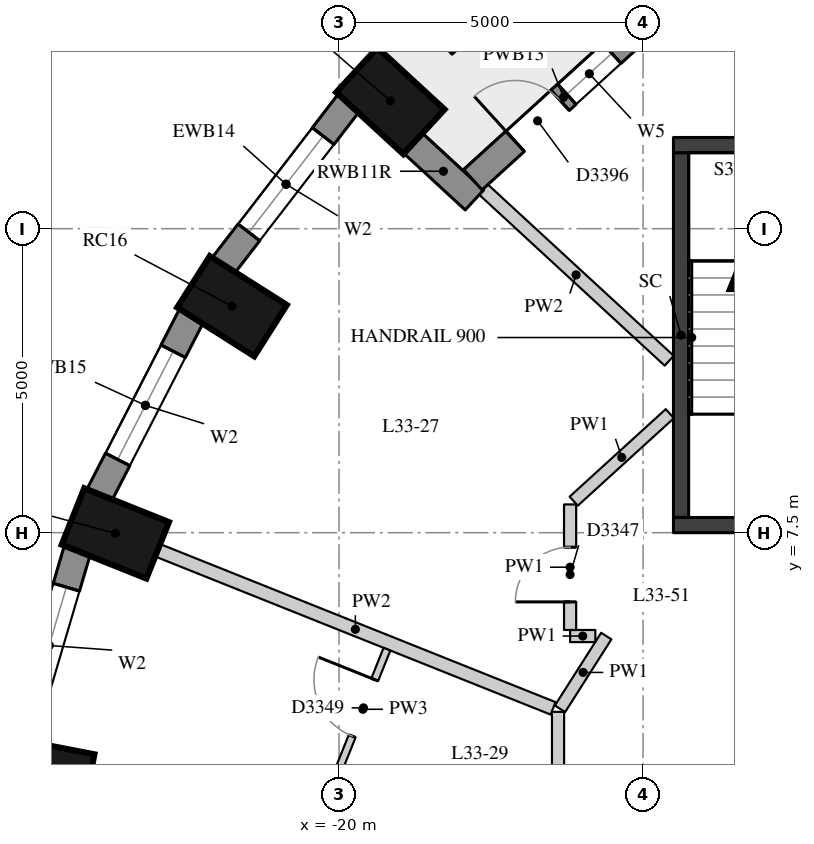
"""IFC4 building model, lengths in metres.
Left out: names, types, materials, properties, quantities, classifications, styles, units other than length and angle.
Written with IfcOpenShell. Run it as: python <this file> out.ifc"""

import sys

from ifc_helpers import new_model, si_unit, direction, frame, frame_2d, origin, origin_2d, place, context, subcontext, project, spatial, rectangle, extrude, element, fill, save


model = new_model("IFC4")
c1 = context("Model", 3, precision=1e-05, world=origin(), true_north=direction((0.0, 1.0)))
c2 = subcontext(c1, "Body", "Model", "MODEL_VIEW")
j1 = project(units=[si_unit("LENGTHUNIT", "METRE"), si_unit("PLANEANGLEUNIT", "RADIAN")], contexts=[c1])
p1 = place(None, origin())
s1 = spatial("IfcSite", under=j1, at=p1, CompositionType="ELEMENT")
p2 = place(p1, origin())
s2 = spatial("IfcBuilding", under=s1, at=p2, CompositionType="ELEMENT")
p3 = place(p2, frame((0.0, 0.0, 118.6)))
s3 = spatial("IfcBuildingStorey", under=s2, at=p3, CompositionType="ELEMENT", Elevation=118.6)
for number, where, z_axis, x_axis in (
    (1, (-19.156, 14.602, 0.0), (0.0, 0.0, 1.0), (-0.735, 0.678, 0.0)),
    (2, (-21.76, 11.225, 0.0), (0.0, 0.0, 1.0), (-0.845, 0.536, 0.0)),
    (3, (-23.679, 7.489, 0.0), (0.0, 0.0, 1.0), (-0.929, 0.371, 0.0)),
    (4, (-24.854, 3.507, 0.0), (0.0, 0.0, 1.0), (-0.982, 0.19, 0.0)),
):
    element("IfcColumn", number, at=place(p3, frame(where, z_axis=z_axis, x_axis=x_axis)), inside=s3, PredefinedType="COLUMN", context=c2, shape_type="SweptSolid", body=[
        extrude(rectangle(XDim=1.5, YDim=1.0, at=origin_2d()), origin(), (0.0, 0.0, 1.0), 3.3),
    ])
p4 = place(p3, frame((-19.835, 14.575, 0.0), z_axis=(0.0, 0.0, 1.0), x_axis=(-0.610693945156, -0.791866721961, 0.0)))
e5 = element("IfcWall", 5, at=p4, inside=s3, PredefinedType="SOLIDWALL", context=c2, shape_type="SweptSolid", body=[
    extrude(rectangle(XDim=3.395, YDim=0.45, at=frame_2d((1.697, 0.0))), origin(), (0.0, 0.0, 1.0), 3.02),
])
p5 = place(p4, frame((0.697, 0.0, 0.4)))
e6 = element("IfcOpeningElement", 6, at=p5, cuts=e5, PredefinedType="OPENING", context=c2, shape_type="SweptSolid", body=[
    extrude(rectangle(XDim=2.0, YDim=1.75, at=frame_2d((1.0, 0.875))), frame((0.0, 0.235, 0.0), z_axis=(0.0, -1.0, 0.0), x_axis=(1.0, 0.0, 0.0)), (0.0, 0.0, 1.0), 0.47),
])
p6 = place(p3, frame((-22.423, 11.077, 0.0), z_axis=(0.0, 0.0, 1.0), x_axis=(-0.456828186229, -0.889554949549, 0.0)))
e7 = element("IfcWall", 7, at=p6, inside=s3, PredefinedType="SOLIDWALL", context=c2, shape_type="SweptSolid", body=[
    extrude(rectangle(XDim=3.333, YDim=0.45, at=frame_2d((1.667, 0.0))), origin(), (0.0, 0.0, 1.0), 3.02),
])
p7 = place(p6, frame((0.666, 0.0, 0.4)))
e8 = element("IfcOpeningElement", 8, at=p7, cuts=e7, PredefinedType="OPENING", context=c2, shape_type="SweptSolid", body=[
    extrude(rectangle(XDim=2.0, YDim=1.75, at=frame_2d((1.0, 0.875))), frame((0.0, 0.235, 0.0), z_axis=(0.0, -1.0, 0.0), x_axis=(1.0, 0.0, 0.0)), (0.0, 0.0, 1.0), 0.47),
])
p8 = place(p3, frame((-24.302, 7.221, 0.0), z_axis=(0.0, 0.0, 1.0), x_axis=(-0.283071248438, -0.959098883488, 0.0)))
e9 = element("IfcWall", 9, at=p8, inside=s3, PredefinedType="SOLIDWALL", context=c2, shape_type="SweptSolid", body=[
    extrude(rectangle(XDim=3.286, YDim=0.45, at=frame_2d((1.643, 0.0))), origin(), (0.0, 0.0, 1.0), 3.02),
])
p9 = place(p8, frame((0.643, 0.0, 0.4)))
e10 = element("IfcOpeningElement", 10, at=p9, cuts=e9, PredefinedType="OPENING", context=c2, shape_type="SweptSolid", body=[
    extrude(rectangle(XDim=2.0, YDim=1.75, at=frame_2d((1.0, 0.875))), frame((0.0, 0.235, 0.0), z_axis=(0.0, -1.0, 0.0), x_axis=(1.0, 0.0, 0.0)), (0.0, 0.0, 1.0), 0.47),
])
p10 = place(p3, frame((-18.795, 13.916, 0.0), z_axis=(0.0, 0.0, 1.0), x_axis=(0.735395448697, -0.677638202905, 0.0)))
e11 = element("IfcWall", 11, at=p10, inside=s3, PredefinedType="SOLIDWALL", context=c2, shape_type="SweptSolid", body=[
    extrude(rectangle(XDim=1.391, YDim=0.45, at=frame_2d((0.695, 0.0))), origin(), (0.0, 0.0, 1.0), 3.02),
])
p11 = place(p3, frame((-14.818, 16.018, 0.0), z_axis=(0.0, 0.0, 1.0), x_axis=(-0.739460283824, -0.673200184675, 0.0)))
e12 = element("IfcWall", 12, at=p11, inside=s3, PredefinedType="SOLIDWALL", context=c2, shape_type="SweptSolid", body=[
    extrude(rectangle(XDim=4.031, YDim=0.45, at=frame_2d((2.016, 0.0))), origin(), (0.0, 0.0, 1.0), 3.02),
])
p12 = place(p11, frame((0.94, 0.0, 0.4)))
e13 = element("IfcOpeningElement", 13, at=p12, cuts=e12, PredefinedType="OPENING", context=c2, shape_type="SweptSolid", body=[
    extrude(rectangle(XDim=1.0, YDim=1.75, at=frame_2d((0.5, 0.875))), frame((0.0, 0.235, 0.0), z_axis=(0.0, -1.0, 0.0), x_axis=(1.0, 0.0, 0.0)), (0.0, 0.0, 1.0), 0.47),
])
p13 = place(p11, frame((2.091, 0.0, 0.0)))
e14 = element("IfcOpeningElement", 14, at=p13, cuts=e12, PredefinedType="OPENING", context=c2, shape_type="SweptSolid", body=[
    extrude(rectangle(XDim=1.0, YDim=2.15, at=frame_2d((0.5, 1.075))), frame((0.0, 0.235, 0.0), z_axis=(0.0, -1.0, 0.0), x_axis=(1.0, 0.0, 0.0)), (0.0, 0.0, 1.0), 0.47),
])
p14 = place(p3, frame((-17.044, 16.839, 0.0), z_axis=(0.0, 0.0, 1.0), x_axis=(-0.740332755969, -0.6722405897, 0.0)))
e15 = element("IfcWall", 15, at=p14, inside=s3, PredefinedType="USERDEFINED", context=c2, shape_type="SweptSolid", body=[
    extrude(rectangle(XDim=1.8, YDim=0.7, at=frame_2d((0.9, 0.0))), origin(), (0.0, 0.0, 1.0), 0.75),
])
p15 = place(p3, frame((-14.375, 7.75, -0.28), z_axis=(0.0, 0.0, 1.0), x_axis=(0.0, 1.0, 0.0)))
e16 = element("IfcWall", 16, at=p15, inside=s3, PredefinedType="SHEAR", context=c2, shape_type="SweptSolid", body=[
    extrude(rectangle(XDim=6.0, YDim=0.25, at=frame_2d((3.0, 0.0))), origin(), (0.0, 0.0, 1.0), 3.3),
])
for number, where, z_axis, x_axis in (
    (17, (-14.5, 13.875, -0.28), (0.0, 0.0, 1.0), (1.0, 0.0, 0.0)),
    (18, (-14.5, 7.625, -0.28), (0.0, 0.0, 1.0), (1.0, 0.0, 0.0)),
):
    element("IfcWall", number, at=place(p3, frame(where, z_axis=z_axis, x_axis=x_axis)), inside=s3, PredefinedType="SHEAR", context=c2, shape_type="SweptSolid", body=[
        extrude(rectangle(XDim=5.2, YDim=0.25, at=frame_2d((2.6, 0.0))), origin(), (0.0, 0.0, 1.0), 3.3),
    ])
p16 = place(p3, frame((-16.398, -5.693, 0.0), z_axis=(0.0, 0.0, 1.0), x_axis=(0.0, 1.0, 0.0)))
e19 = element("IfcWall", 19, at=p16, inside=s3, PredefinedType="PARTITIONING", context=c2, shape_type="SweptSolid", body=[
    extrude(rectangle(XDim=10.246, YDim=0.2, at=frame_2d((5.123, 0.0))), origin(), (0.0, 0.0, 1.0), 3.02),
])
p17 = place(p16, frame((6.539, 0.0, 0.0)))
e20 = element("IfcOpeningElement", 20, at=p17, cuts=e19, PredefinedType="OPENING", context=c2, shape_type="SweptSolid", body=[
    extrude(rectangle(XDim=1.1, YDim=2.1, at=frame_2d((0.55, 1.05))), frame((0.0, 0.11, 0.0), z_axis=(0.0, -1.0, 0.0), x_axis=(1.0, 0.0, 0.0)), (0.0, 0.0, 1.0), 0.22),
])
p18 = place(p16, frame((3.337, 0.0, 0.0)))
e21 = element("IfcOpeningElement", 21, at=p18, cuts=e19, PredefinedType="OPENING", context=c2, shape_type="SweptSolid", body=[
    extrude(rectangle(XDim=1.1, YDim=2.1, at=frame_2d((0.55, 1.05))), frame((0.0, 0.11, 0.0), z_axis=(0.0, -1.0, 0.0), x_axis=(1.0, 0.0, 0.0)), (0.0, 0.0, 1.0), 0.22),
])
p19 = place(p3, frame((-16.366, 4.604, 0.0), z_axis=(0.0, 0.0, 1.0), x_axis=(0.536775234189, 0.843725279911, 0.0)))
e22 = element("IfcWall", 22, at=p19, inside=s3, PredefinedType="PARTITIONING", context=c2, shape_type="SweptSolid", body=[
    extrude(rectangle(XDim=1.418, YDim=0.2, at=frame_2d((0.709, 0.0))), origin(), (0.0, 0.0, 1.0), 3.02),
])
p20 = place(p3, frame((-15.785, 5.8, 0.0), z_axis=(0.0, 0.0, 1.0), x_axis=(-1.0, 0.0, 0.0)))
e23 = element("IfcWall", 23, at=p20, inside=s3, PredefinedType="PARTITIONING", context=c2, shape_type="SweptSolid", body=[
    extrude(rectangle(XDim=0.415, YDim=0.2, at=frame_2d((0.208, 0.0))), origin(), (0.0, 0.0, 1.0), 3.02),
])
p21 = place(p3, frame((-16.2, 5.9, 0.0), z_axis=(0.0, 0.0, 1.0), x_axis=(0.0, 1.0, 0.0)))
e24 = element("IfcWall", 24, at=p21, inside=s3, PredefinedType="PARTITIONING", context=c2, shape_type="SweptSolid", body=[
    extrude(rectangle(XDim=2.065, YDim=0.2, at=frame_2d((1.032, 0.0))), origin(), (0.0, 0.0, 1.0), 3.02),
])
p22 = place(p21, frame((0.462, 0.0, 0.0)))
e25 = element("IfcOpeningElement", 25, at=p22, cuts=e24, PredefinedType="OPENING", context=c2, shape_type="SweptSolid", body=[
    extrude(rectangle(XDim=0.9, YDim=2.1, at=frame_2d((0.45, 1.05))), frame((0.0, 0.11, 0.0), z_axis=(0.0, -1.0, 0.0), x_axis=(1.0, 0.0, 0.0)), (0.0, 0.0, 1.0), 0.22),
])
p23 = place(p3, frame((-16.14, 8.019, 0.0), z_axis=(0.0, 0.0, 1.0), x_axis=(0.739392120684, 0.673275049197, 0.0)))
e26 = element("IfcWall", 26, at=p23, inside=s3, PredefinedType="PARTITIONING", context=c2, shape_type="SweptSolid", body=[
    extrude(rectangle(XDim=2.138, YDim=0.2, at=frame_2d((1.069, 0.0))), origin(), (0.0, 0.0, 1.0), 3.02),
])
p24 = place(p3, frame((-17.633, 13.151, 0.0), z_axis=(0.0, 0.0, 1.0), x_axis=(0.73535370522, -0.677683501511, 0.0)))
e27 = element("IfcWall", 27, at=p24, inside=s3, PredefinedType="PARTITIONING", context=c2, shape_type="SweptSolid", body=[
    extrude(rectangle(XDim=4.166, YDim=0.22, at=frame_2d((2.083, 0.0))), origin(), (0.0, 0.0, 1.0), 3.02),
])
p25 = place(p3, frame((-22.983, 7.21, 0.0), z_axis=(0.0, 0.0, 1.0), x_axis=(0.928548801607, -0.371210348771, 0.0)))
e28 = element("IfcWall", 28, at=p25, inside=s3, PredefinedType="PARTITIONING", context=c2, shape_type="SweptSolid", body=[
    extrude(rectangle(XDim=7.003, YDim=0.22, at=frame_2d((3.501, 0.0))), origin(), (0.0, 0.0, 1.0), 3.02),
])
p26 = place(p3, frame((-20.003, 3.607, 0.0), z_axis=(0.0, 0.0, 1.0), x_axis=(0.371351153758, 0.928492498948, 0.0)))
e29 = element("IfcWall", 29, at=p26, inside=s3, PredefinedType="PARTITIONING", context=c2, shape_type="SweptSolid", body=[
    extrude(rectangle(XDim=2.13, YDim=0.12, at=frame_2d((1.065, 0.0))), origin(), (0.0, 0.0, 1.0), 3.02),
])
p27 = place(p26, frame((0.59, 0.0, 0.0)))
e30 = element("IfcOpeningElement", 30, at=p27, cuts=e29, PredefinedType="OPENING", context=c2, shape_type="SweptSolid", body=[
    extrude(rectangle(XDim=1.0, YDim=2.1, at=frame_2d((0.5, 1.05))), frame((0.0, 0.07, 0.0), z_axis=(0.0, -1.0, 0.0), x_axis=(1.0, 0.0, 0.0)), (0.0, 0.0, 1.0), 0.14),
])
p28 = place(p3, frame((-13.554, 0.0, 0.0), z_axis=(0.0, 0.0, 1.0), x_axis=(0.382730523909, 0.923860025149, 0.0)))
e31 = element("IfcWall", 31, at=p28, inside=s3, PredefinedType="PARTITIONING", context=c2, shape_type="SweptSolid", body=[
    extrude(rectangle(XDim=4.251, YDim=0.1, at=frame_2d((2.125, 0.0))), origin(), (0.0, 0.0, 1.0), 3.02),
])
p29 = place(p5, origin())
e32 = element("IfcWindow", 32, at=p29, inside=s3, PartitioningType="SINGLE_PANEL", PredefinedType="WINDOW", context=c2, shape_type="SweptSolid", body=[
    extrude(rectangle(XDim=2.0, YDim=1.75, at=frame_2d((1.0, 0.875))), frame((0.0, 0.035, 0.0), z_axis=(0.0, -1.0, 0.0), x_axis=(1.0, 0.0, 0.0)), (0.0, 0.0, 1.0), 0.06),
])
fill(e6, e32)
p30 = place(p7, origin())
e33 = element("IfcWindow", 33, at=p30, inside=s3, PartitioningType="SINGLE_PANEL", PredefinedType="WINDOW", context=c2, shape_type="SweptSolid", body=[
    extrude(rectangle(XDim=2.0, YDim=1.75, at=frame_2d((1.0, 0.875))), frame((0.0, 0.035, 0.0), z_axis=(0.0, -1.0, 0.0), x_axis=(1.0, 0.0, 0.0)), (0.0, 0.0, 1.0), 0.06),
])
fill(e8, e33)
p31 = place(p9, origin())
e34 = element("IfcWindow", 34, at=p31, inside=s3, PartitioningType="SINGLE_PANEL", PredefinedType="WINDOW", context=c2, shape_type="SweptSolid", body=[
    extrude(rectangle(XDim=2.0, YDim=1.75, at=frame_2d((1.0, 0.875))), frame((0.0, 0.035, 0.0), z_axis=(0.0, -1.0, 0.0), x_axis=(1.0, 0.0, 0.0)), (0.0, 0.0, 1.0), 0.06),
])
fill(e10, e34)
p32 = place(p12, origin())
e35 = element("IfcWindow", 35, at=p32, inside=s3, PartitioningType="SINGLE_PANEL", PredefinedType="WINDOW", context=c2, shape_type="SweptSolid", body=[
    extrude(rectangle(XDim=1.0, YDim=1.75, at=frame_2d((0.5, 0.875))), frame((0.0, 0.035, 0.0), z_axis=(0.0, -1.0, 0.0), x_axis=(1.0, 0.0, 0.0)), (0.0, 0.0, 1.0), 0.06),
])
fill(e13, e35)
p33 = place(p13, frame((1.0, 0.0, 0.0), z_axis=(0.0, 0.0, 1.0), x_axis=(-1.0, 0.0, 0.0)))
e36 = element("IfcDoor", 36, at=p33, inside=s3, OperationType="SINGLE_SWING_LEFT", PredefinedType="DOOR", context=c2, shape_type="SweptSolid", body=[
    extrude(rectangle(XDim=1.0, YDim=2.15, at=frame_2d((0.5, 1.075))), frame((0.0, 0.075, 0.0), z_axis=(0.0, -1.0, 0.0), x_axis=(1.0, 0.0, 0.0)), (0.0, 0.0, 1.0), 0.05),
])
fill(e14, e36)
p34 = place(p22, origin())
e37 = element("IfcDoor", 37, at=p34, inside=s3, OperationType="SINGLE_SWING_LEFT", PredefinedType="DOOR", context=c2, shape_type="SweptSolid", body=[
    extrude(rectangle(XDim=0.9, YDim=2.1, at=frame_2d((0.45, 1.05))), frame((0.0, 0.025, 0.0), z_axis=(0.0, -1.0, 0.0), x_axis=(1.0, 0.0, 0.0)), (0.0, 0.0, 1.0), 0.05),
])
fill(e25, e37)
p35 = place(p27, origin())
e38 = element("IfcDoor", 38, at=p35, inside=s3, OperationType="SINGLE_SWING_RIGHT", PredefinedType="DOOR", context=c2, shape_type="SweptSolid", body=[
    extrude(rectangle(XDim=1.0, YDim=2.1, at=frame_2d((0.5, 1.05))), frame((0.0, 0.025, 0.0), z_axis=(0.0, -1.0, 0.0), x_axis=(1.0, 0.0, 0.0)), (0.0, 0.0, 1.0), 0.05),
])
fill(e30, e38)
save(model, sys.argv[1])
